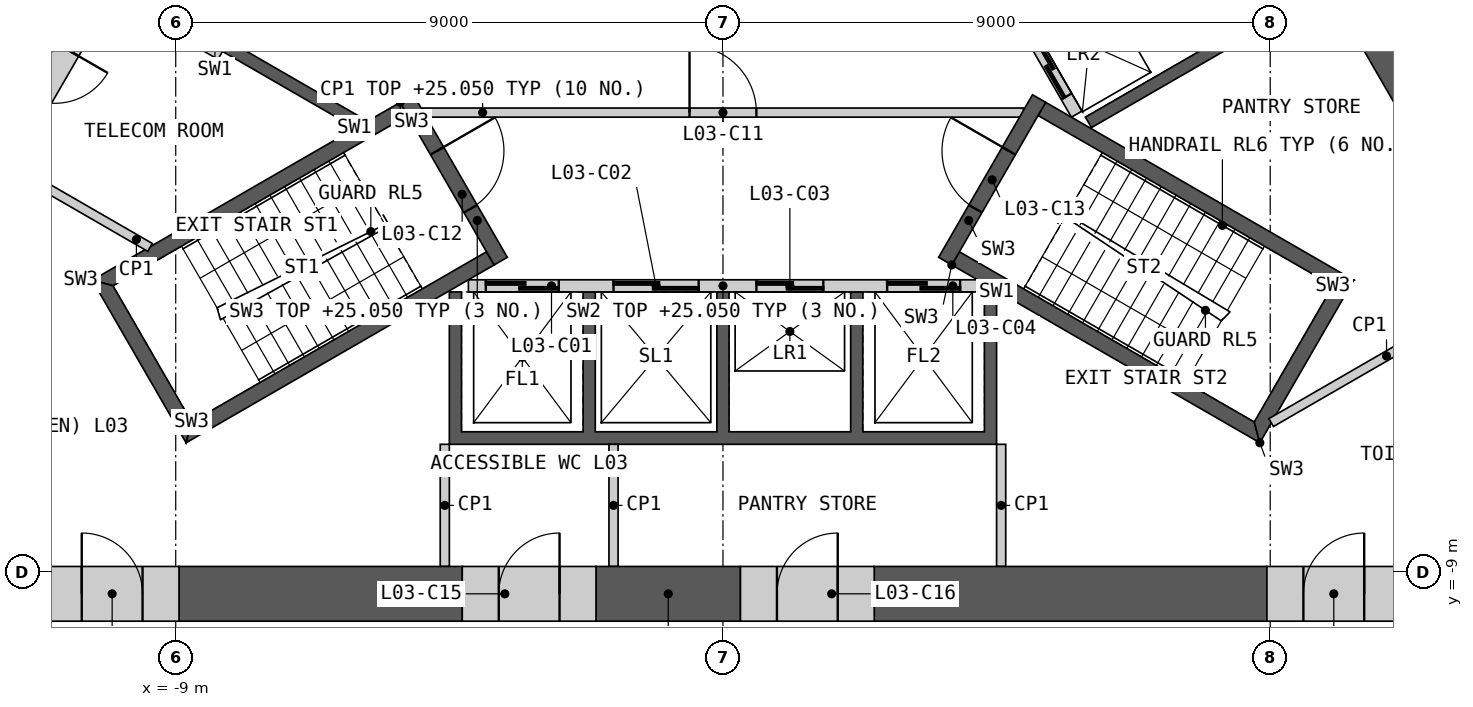
"""IFC4 building model, lengths in metres.
Left out: names, types, materials, properties, quantities, classifications, styles, units other than length and angle.
Written with IfcOpenShell. Run it as: python <this file> out.ifc"""

import sys

from ifc_helpers import new_model, si_unit, direction, frame, frame_2d, origin, place, context, subcontext, project, spatial, polyline, rectangle, outline, extrude, element, fill, save


model = new_model("IFC4")
c1 = context("Model", 3, precision=1e-05, world=origin(), true_north=direction((0.0, 1.0)))
c2 = subcontext(c1, "Body", "Model", "MODEL_VIEW")
j1 = project(units=[si_unit("LENGTHUNIT", "METRE"), si_unit("PLANEANGLEUNIT", "RADIAN")], contexts=[c1])
p1 = place(None, origin())
s1 = spatial("IfcSite", under=j1, at=p1, CompositionType="ELEMENT")
p2 = place(p1, origin())
s2 = spatial("IfcBuilding", under=s1, at=p2, CompositionType="ELEMENT")
p3 = place(p2, frame((0.0, 0.0, 21.0)))
s3 = spatial("IfcBuildingStorey", under=s2, at=p3, CompositionType="ELEMENT", Elevation=21.0)
p4 = place(p3, origin())
e1 = element("IfcWall", 1, at=p4, inside=s3, PredefinedType="SHEAR", context=c2, shape_type="SweptSolid", body=[
    extrude(outline(polyline([(4.5, -4.4), (4.5, -6.906), (-4.5, -6.906), (-4.5, -4.4), (-4.3, -4.4), (-4.3, -6.7), (-2.3, -6.7), (-2.3, -4.4), (-2.1, -4.4), (-2.1, -6.7), (-0.1, -6.7), (-0.1, -4.4), (0.1, -4.4), (0.1, -6.7), (2.1, -6.7), (2.1, -4.4), (2.3, -4.4), (2.3, -6.7), (4.3, -6.7), (4.3, -4.4), (4.5, -4.4)])), origin(), (0.0, 0.0, 1.0), 4.05),
])
p5 = place(p3, frame((-4.187, -4.3, 0.0), z_axis=(0.0, 0.0, 1.0), x_axis=(1.0, 0.0, 0.0)))
e2 = element("IfcWall", 2, at=p5, inside=s3, PredefinedType="SOLIDWALL", context=c2, shape_type="SweptSolid", body=[
    extrude(rectangle(XDim=8.373, YDim=0.2, at=frame_2d((4.187, 0.0))), origin(), (0.0, 0.0, 1.0), 4.05),
])
p6 = place(p5, frame((0.287, 0.0, 0.0)))
e3 = element("IfcOpeningElement", 3, at=p6, cuts=e2, PredefinedType="OPENING", context=c2, shape_type="SweptSolid", body=[
    extrude(rectangle(XDim=1.2, YDim=2.1, at=frame_2d((0.6, 1.05))), frame((0.0, 0.11, 0.0), z_axis=(0.0, -1.0, 0.0), x_axis=(1.0, 0.0, 0.0)), (0.0, 0.0, 1.0), 0.22),
])
p7 = place(p5, frame((2.387, 0.0, 0.0)))
e4 = element("IfcOpeningElement", 4, at=p7, cuts=e2, PredefinedType="OPENING", context=c2, shape_type="SweptSolid", body=[
    extrude(rectangle(XDim=1.4, YDim=2.1, at=frame_2d((0.7, 1.05))), frame((0.0, 0.11, 0.0), z_axis=(0.0, -1.0, 0.0), x_axis=(1.0, 0.0, 0.0)), (0.0, 0.0, 1.0), 0.22),
])
p8 = place(p5, frame((4.737, 0.0, 0.0)))
e5 = element("IfcOpeningElement", 5, at=p8, cuts=e2, PredefinedType="OPENING", context=c2, shape_type="SweptSolid", body=[
    extrude(rectangle(XDim=1.1, YDim=2.1, at=frame_2d((0.55, 1.05))), frame((0.0, 0.11, 0.0), z_axis=(0.0, -1.0, 0.0), x_axis=(1.0, 0.0, 0.0)), (0.0, 0.0, 1.0), 0.22),
])
p9 = place(p5, frame((6.887, 0.0, 0.0)))
e6 = element("IfcOpeningElement", 6, at=p9, cuts=e2, PredefinedType="OPENING", context=c2, shape_type="SweptSolid", body=[
    extrude(rectangle(XDim=1.2, YDim=2.1, at=frame_2d((0.6, 1.05))), frame((0.0, 0.11, 0.0), z_axis=(0.0, -1.0, 0.0), x_axis=(1.0, 0.0, 0.0)), (0.0, 0.0, 1.0), 0.22),
])
p10 = place(p3, origin())
e7 = element("IfcWall", 7, at=p10, inside=s3, PredefinedType="SHEAR", context=c2, shape_type="SweptSolid", body=[
    extrude(outline(polyline([(2.66, 4.192), (4.831, 5.445), (8.231, -0.444), (6.061, -1.697), (5.96, -1.524), (7.952, -0.374), (6.952, 1.358), (4.96, 0.208), (4.861, 0.381), (6.852, 1.531), (5.852, 3.263), (3.861, 2.113), (3.76, 2.287), (5.752, 3.437), (4.752, 5.169), (2.76, 4.019), (2.66, 4.192)])), origin(), (0.0, 0.0, 1.0), 4.05),
])
p11 = place(p3, frame((5.817, -1.476, 0.0), z_axis=(0.0, 0.0, 1.0), x_axis=(-0.500002616675, 0.866023893041, 0.0)))
e8 = element("IfcWall", 8, at=p11, inside=s3, PredefinedType="SOLIDWALL", context=c2, shape_type="SweptSolid", body=[
    extrude(rectangle(XDim=8.373, YDim=0.2, at=frame_2d((4.187, 0.0))), origin(), (0.0, 0.0, 1.0), 4.05),
])
p12 = place(p11, frame((0.337, 0.0, 0.0)))
e9 = element("IfcOpeningElement", 9, at=p12, cuts=e8, PredefinedType="OPENING", context=c2, shape_type="SweptSolid", body=[
    extrude(rectangle(XDim=1.1, YDim=2.1, at=frame_2d((0.55, 1.05))), frame((0.0, 0.11, 0.0), z_axis=(0.0, -1.0, 0.0), x_axis=(1.0, 0.0, 0.0)), (0.0, 0.0, 1.0), 0.22),
])
p13 = place(p11, frame((2.537, 0.0, 0.0)))
e10 = element("IfcOpeningElement", 10, at=p13, cuts=e8, PredefinedType="OPENING", context=c2, shape_type="SweptSolid", body=[
    extrude(rectangle(XDim=1.1, YDim=2.1, at=frame_2d((0.55, 1.05))), frame((0.0, 0.11, 0.0), z_axis=(0.0, -1.0, 0.0), x_axis=(1.0, 0.0, 0.0)), (0.0, 0.0, 1.0), 0.22),
])
p14 = place(p11, frame((4.737, 0.0, 0.0)))
e11 = element("IfcOpeningElement", 11, at=p14, cuts=e8, PredefinedType="OPENING", context=c2, shape_type="SweptSolid", body=[
    extrude(rectangle(XDim=1.1, YDim=2.1, at=frame_2d((0.55, 1.05))), frame((0.0, 0.11, 0.0), z_axis=(0.0, -1.0, 0.0), x_axis=(1.0, 0.0, 0.0)), (0.0, 0.0, 1.0), 0.22),
])
p15 = place(p11, frame((7.037, 0.0, 0.0)))
e12 = element("IfcOpeningElement", 12, at=p15, cuts=e8, PredefinedType="OPENING", context=c2, shape_type="SweptSolid", body=[
    extrude(rectangle(XDim=0.9, YDim=2.1, at=frame_2d((0.45, 1.05))), frame((0.0, 0.11, 0.0), z_axis=(0.0, -1.0, 0.0), x_axis=(1.0, 0.0, 0.0)), (0.0, 0.0, 1.0), 0.22),
])
p16 = place(p3, origin())
e13 = element("IfcWall", 13, at=p16, inside=s3, PredefinedType="SHEAR", context=c2, shape_type="SweptSolid", body=[
    extrude(outline(polyline([(-6.061, -1.697), (-8.231, -0.444), (-8.131, -0.271), (-5.96, -1.524), (-6.061, -1.697)])), origin(), (0.0, 0.0, 1.0), 4.05),
])
p17 = place(p3, frame((-4.941, -1.45, 0.0), z_axis=(0.0, 0.0, 1.0), x_axis=(1.0, 0.0, 0.0)))
e14 = element("IfcWall", 14, at=p17, inside=s3, PredefinedType="PARTITIONING", context=c2, shape_type="SweptSolid", body=[
    extrude(rectangle(XDim=9.882, YDim=0.15, at=frame_2d((4.941, 0.0))), origin(), (0.0, 0.0, 1.0), 4.05),
])
p18 = place(p17, frame((4.391, 0.0, 0.0)))
e15 = element("IfcOpeningElement", 15, at=p18, cuts=e14, PredefinedType="OPENING", context=c2, shape_type="SweptSolid", body=[
    extrude(rectangle(XDim=1.1, YDim=2.1, at=frame_2d((0.55, 1.05))), frame((0.0, 0.085, 0.0), z_axis=(0.0, -1.0, 0.0), x_axis=(1.0, 0.0, 0.0)), (0.0, 0.0, 1.0), 0.17),
])
p19 = place(p3, origin())
e16 = element("IfcWall", 16, at=p19, inside=s3, PredefinedType="SHEAR", context=c2, shape_type="SweptSolid", body=[
    extrude(outline(polyline([(-5.307, -1.281), (-10.374, -4.206), (-10.032, -4.298), (-5.182, -1.498), (-5.307, -1.281)])), origin(), (0.0, 0.0, 1.0), 4.05),
])
p20 = place(p3, origin())
e17 = element("IfcWall", 17, at=p20, inside=s3, PredefinedType="SHEAR", context=c2, shape_type="SweptSolid", body=[
    extrude(outline(polyline([(-10.374, -4.206), (-8.83, -6.881), (-8.738, -6.539), (-10.032, -4.298), (-10.374, -4.206)])), origin(), (0.0, 0.0, 1.0), 4.05),
])
p21 = place(p3, origin())
e18 = element("IfcWall", 18, at=p21, inside=s3, PredefinedType="SHEAR", context=c2, shape_type="SweptSolid", body=[
    extrude(outline(polyline([(-8.738, -6.539), (-8.83, -6.881), (-3.763, -3.956), (-3.888, -3.739), (-8.738, -6.539)])), origin(), (0.0, 0.0, 1.0), 4.05),
])
p22 = place(p3, frame((-5.199, -1.219, 0.0), z_axis=(0.0, 0.0, 1.0), x_axis=(0.499982516597, -0.866035497597, 0.0)))
e19 = element("IfcWall", 19, at=p22, inside=s3, PredefinedType="SHEAR", context=c2, shape_type="SweptSolid", body=[
    extrude(rectangle(XDim=3.088, YDim=0.25, at=frame_2d((1.544, 0.0))), origin(), (0.0, 0.0, 1.0), 4.05),
])
p23 = place(p22, frame((0.994, 0.0, 0.0)))
e20 = element("IfcOpeningElement", 20, at=p23, cuts=e19, PredefinedType="OPENING", context=c2, shape_type="SweptSolid", body=[
    extrude(rectangle(XDim=1.1, YDim=2.1, at=frame_2d((0.55, 1.05))), frame((0.0, 0.135, 0.0), z_axis=(0.0, -1.0, 0.0), x_axis=(1.0, 0.0, 0.0)), (0.0, 0.0, 1.0), 0.27),
])
p24 = place(p3, origin())
e21 = element("IfcWall", 21, at=p24, inside=s3, PredefinedType="SHEAR", context=c2, shape_type="SweptSolid", body=[
    extrude(outline(polyline([(3.763, -3.956), (8.83, -6.881), (8.738, -6.539), (3.888, -3.739), (3.763, -3.956)])), origin(), (0.0, 0.0, 1.0), 4.05),
])
p25 = place(p3, origin())
e22 = element("IfcWall", 22, at=p25, inside=s3, PredefinedType="SHEAR", context=c2, shape_type="SweptSolid", body=[
    extrude(outline(polyline([(8.83, -6.881), (10.374, -4.206), (10.032, -4.298), (8.738, -6.539), (8.83, -6.881)])), origin(), (0.0, 0.0, 1.0), 4.05),
])
p26 = place(p3, origin())
e23 = element("IfcWall", 23, at=p26, inside=s3, PredefinedType="SHEAR", context=c2, shape_type="SweptSolid", body=[
    extrude(outline(polyline([(10.032, -4.298), (10.374, -4.206), (5.307, -1.281), (5.182, -1.498), (10.032, -4.298)])), origin(), (0.0, 0.0, 1.0), 4.05),
])
p27 = place(p3, frame((3.655, -3.893, 0.0), z_axis=(0.0, 0.0, 1.0), x_axis=(0.499982516597, 0.866035497597, 0.0)))
e24 = element("IfcWall", 24, at=p27, inside=s3, PredefinedType="SHEAR", context=c2, shape_type="SweptSolid", body=[
    extrude(rectangle(XDim=3.088, YDim=0.25, at=frame_2d((1.544, 0.0))), origin(), (0.0, 0.0, 1.0), 4.05),
])
p28 = place(p27, frame((0.994, 0.0, 0.0)))
e25 = element("IfcOpeningElement", 25, at=p28, cuts=e24, PredefinedType="OPENING", context=c2, shape_type="SweptSolid", body=[
    extrude(rectangle(XDim=1.1, YDim=2.1, at=frame_2d((0.55, 1.05))), frame((0.0, 0.135, 0.0), z_axis=(0.0, -1.0, 0.0), x_axis=(1.0, 0.0, 0.0)), (0.0, 0.0, 1.0), 0.27),
])
p29 = place(p3, frame((-8.268, -0.509, 0.0), z_axis=(0.0, 0.0, 1.0), x_axis=(-0.866035824272, 0.499981950752, 0.0)))
e26 = element("IfcWall", 26, at=p29, inside=s3, PredefinedType="PARTITIONING", context=c2, shape_type="SweptSolid", body=[
    extrude(rectangle(XDim=2.009, YDim=0.15, at=frame_2d((1.004, 0.0))), origin(), (0.0, 0.0, 1.0), 4.05),
])
for number, where, z_axis, x_axis in (
    (27, (4.575, -6.906, 0.0), (0.0, 0.0, 1.0), (0.0, -1.0, 0.0)),
    (28, (-4.575, -6.906, 0.0), (0.0, 0.0, 1.0), (0.0, -1.0, 0.0)),
):
    element("IfcWall", number, at=place(p3, frame(where, z_axis=z_axis, x_axis=x_axis)), inside=s3, PredefinedType="PARTITIONING", context=c2, shape_type="SweptSolid", body=[
        extrude(rectangle(XDim=2.009, YDim=0.15, at=frame_2d((1.004, 0.0))), origin(), (0.0, 0.0, 1.0), 4.05),
    ])
p30 = place(p3, frame((12.81, -4.358, 0.0), z_axis=(0.0, 0.0, 1.0), x_axis=(-0.866043624834, -0.499968438888, 0.0)))
e29 = element("IfcWall", 29, at=p30, inside=s3, PredefinedType="PARTITIONING", context=c2, shape_type="SweptSolid", body=[
    extrude(rectangle(XDim=4.382, YDim=0.15, at=frame_2d((2.191, 0.0))), origin(), (0.0, 0.0, 1.0), 4.05),
])
p31 = place(p3, frame((-11.664, -2.373, 0.0), z_axis=(0.0, 0.0, 1.0), x_axis=(0.866075643493, -0.499912972175, 0.0)))
e30 = element("IfcWall", 30, at=p31, inside=s3, PredefinedType="PARTITIONING", context=c2, shape_type="SweptSolid", body=[
    extrude(rectangle(XDim=2.588, YDim=0.15, at=frame_2d((1.294, 0.0))), origin(), (0.0, 0.0, 1.0), 4.05),
])
p32 = place(p3, frame((-1.8, -8.915, 0.0), z_axis=(0.0, 0.0, 1.0), x_axis=(0.0, 1.0, 0.0)))
e31 = element("IfcWall", 31, at=p32, inside=s3, PredefinedType="PARTITIONING", context=c2, shape_type="SweptSolid", body=[
    extrude(rectangle(XDim=2.009, YDim=0.15, at=frame_2d((1.004, 0.0))), origin(), (0.0, 0.0, 1.0), 4.05),
])
p33 = place(p3, frame((2.488, -9.365, 0.0), z_axis=(0.0, 0.0, 1.0), x_axis=(1.0, 0.0, 0.0)))
e32 = element("IfcWall", 32, at=p33, inside=s3, PredefinedType="SHEAR", context=c2, shape_type="SweptSolid", body=[
    extrude(rectangle(XDim=6.458, YDim=0.9, at=frame_2d((3.229, 0.0))), origin(), (0.0, 0.0, 1.0), 4.05),
])
p34 = place(p3, frame((-8.946, -9.365, 0.0), z_axis=(0.0, 0.0, 1.0), x_axis=(1.0, 0.0, 0.0)))
e33 = element("IfcWall", 33, at=p34, inside=s3, PredefinedType="SHEAR", context=c2, shape_type="SweptSolid", body=[
    extrude(rectangle(XDim=4.658, YDim=0.9, at=frame_2d((2.329, 0.0))), origin(), (0.0, 0.0, 1.0), 4.05),
])
p35 = place(p3, frame((-2.087, -9.365, 0.0), z_axis=(0.0, 0.0, 1.0), x_axis=(1.0, 0.0, 0.0)))
e34 = element("IfcWall", 34, at=p35, inside=s3, PredefinedType="SHEAR", context=c2, shape_type="SweptSolid", body=[
    extrude(rectangle(XDim=2.375, YDim=0.9, at=frame_2d((1.188, 0.0))), origin(), (0.0, 0.0, 1.0), 4.05),
])
p36 = place(p3, frame((15.831, -8.69, 0.0), z_axis=(0.0, 0.0, 1.0), x_axis=(-0.500001798008, 0.866024365702, 0.0)))
e35 = element("IfcWall", 35, at=p36, inside=s3, PredefinedType="SHEAR", context=c2, shape_type="SweptSolid", body=[
    extrude(rectangle(XDim=10.339, YDim=0.9, at=frame_2d((5.17, 0.0))), origin(), (0.0, 0.0, 1.0), 4.05),
])
p37 = place(p3, frame((-4.288, -9.365, 0.0), z_axis=(0.0, 0.0, 1.0), x_axis=(1.0, 0.0, 0.0)))
e36 = element("IfcWall", 36, at=p37, inside=s3, PredefinedType="SHEAR", context=c2, shape_type="SweptSolid", body=[
    extrude(rectangle(XDim=2.2, YDim=0.9, at=frame_2d((1.1, 0.0))), origin(), (0.0, 0.0, 1.0), 4.05),
])
p38 = place(p37, frame((0.6, 0.0, 0.0)))
e37 = element("IfcOpeningElement", 37, at=p38, cuts=e36, PredefinedType="OPENING", context=c2, shape_type="SweptSolid", body=[
    extrude(rectangle(XDim=1.0, YDim=2.1, at=frame_2d((0.5, 1.05))), frame((0.0, 0.46, 0.0), z_axis=(0.0, -1.0, 0.0), x_axis=(1.0, 0.0, 0.0)), (0.0, 0.0, 1.0), 0.92),
])
p39 = place(p3, frame((0.288, -9.365, 0.0), z_axis=(0.0, 0.0, 1.0), x_axis=(1.0, 0.0, 0.0)))
e38 = element("IfcWall", 38, at=p39, inside=s3, PredefinedType="SHEAR", context=c2, shape_type="SweptSolid", body=[
    extrude(rectangle(XDim=2.2, YDim=0.9, at=frame_2d((1.1, 0.0))), origin(), (0.0, 0.0, 1.0), 4.05),
])
p40 = place(p39, frame((0.6, 0.0, 0.0)))
e39 = element("IfcOpeningElement", 39, at=p40, cuts=e38, PredefinedType="OPENING", context=c2, shape_type="SweptSolid", body=[
    extrude(rectangle(XDim=1.0, YDim=2.1, at=frame_2d((0.5, 1.05))), frame((0.0, 0.46, 0.0), z_axis=(0.0, -1.0, 0.0), x_axis=(1.0, 0.0, 0.0)), (0.0, 0.0, 1.0), 0.92),
])
p41 = place(p3, frame((8.946, -9.365, 0.0), z_axis=(0.0, 0.0, 1.0), x_axis=(1.0, 0.0, 0.0)))
e40 = element("IfcWall", 40, at=p41, inside=s3, PredefinedType="SHEAR", context=c2, shape_type="SweptSolid", body=[
    extrude(rectangle(XDim=2.2, YDim=0.9, at=frame_2d((1.1, 0.0))), origin(), (0.0, 0.0, 1.0), 4.05),
])
p42 = place(p41, frame((0.6, 0.0, 0.0)))
e41 = element("IfcOpeningElement", 41, at=p42, cuts=e40, PredefinedType="OPENING", context=c2, shape_type="SweptSolid", body=[
    extrude(rectangle(XDim=1.0, YDim=2.1, at=frame_2d((0.5, 1.05))), frame((0.0, 0.46, 0.0), z_axis=(0.0, -1.0, 0.0), x_axis=(1.0, 0.0, 0.0)), (0.0, 0.0, 1.0), 0.92),
])
p43 = place(p3, frame((-11.146, -9.365, 0.0), z_axis=(0.0, 0.0, 1.0), x_axis=(1.0, 0.0, 0.0)))
e42 = element("IfcWall", 42, at=p43, inside=s3, PredefinedType="SHEAR", context=c2, shape_type="SweptSolid", body=[
    extrude(rectangle(XDim=2.2, YDim=0.9, at=frame_2d((1.1, 0.0))), origin(), (0.0, 0.0, 1.0), 4.05),
])
p44 = place(p43, frame((0.6, 0.0, 0.0)))
e43 = element("IfcOpeningElement", 43, at=p44, cuts=e42, PredefinedType="OPENING", context=c2, shape_type="SweptSolid", body=[
    extrude(rectangle(XDim=1.0, YDim=2.1, at=frame_2d((0.5, 1.05))), frame((0.0, 0.46, 0.0), z_axis=(0.0, -1.0, 0.0), x_axis=(1.0, 0.0, 0.0)), (0.0, 0.0, 1.0), 0.92),
])
p45 = place(p3, frame((-10.31, 0.872, 0.0), z_axis=(0.0, 0.0, 1.0), x_axis=(-0.499982003349, -0.866035793907, 0.0)))
e44 = element("IfcWall", 44, at=p45, inside=s3, PredefinedType="SHEAR", context=c2, shape_type="SweptSolid", body=[
    extrude(rectangle(XDim=2.931, YDim=0.9, at=frame_2d((1.466, 0.0))), origin(), (0.0, 0.0, 1.0), 4.05),
])
p46 = place(p45, frame((1.35, 0.0, 0.0)))
e45 = element("IfcOpeningElement", 45, at=p46, cuts=e44, PredefinedType="OPENING", context=c2, shape_type="SweptSolid", body=[
    extrude(rectangle(XDim=1.0, YDim=2.1, at=frame_2d((0.5, 1.05))), frame((0.0, 0.46, 0.0), z_axis=(0.0, -1.0, 0.0), x_axis=(1.0, 0.0, 0.0)), (0.0, 0.0, 1.0), 0.92),
])
p47 = place(p3, frame((-15.698, -2.759, 0.0), z_axis=(0.0, 0.0, 1.0), x_axis=(0.500004292778, 0.866022925334, 0.0)))
e46 = element("IfcWall", 46, at=p47, inside=s3, PredefinedType="PARTITIONING", context=c2, shape_type="SweptSolid", body=[
    extrude(rectangle(XDim=9.898, YDim=0.2, at=frame_2d((4.949, 0.0))), origin(), (0.0, 0.0, 1.0), 4.05),
])
p48 = place(p47, frame((4.1, 0.0, 0.0)))
e47 = element("IfcOpeningElement", 47, at=p48, cuts=e46, PredefinedType="OPENING", context=c2, shape_type="SweptSolid", body=[
    extrude(rectangle(XDim=1.8, YDim=2.1, at=frame_2d((0.9, 1.05))), frame((0.0, 0.11, 0.0), z_axis=(0.0, -1.0, 0.0), x_axis=(1.0, 0.0, 0.0)), (0.0, 0.0, 1.0), 0.22),
])
p49 = place(p3, frame((10.749, 5.813, 0.0), z_axis=(0.0, 0.0, 1.0), x_axis=(0.500017363087, -0.866015378969, 0.0)))
e48 = element("IfcWall", 48, at=p49, inside=s3, PredefinedType="PARTITIONING", context=c2, shape_type="SweptSolid", body=[
    extrude(rectangle(XDim=9.77, YDim=0.2, at=frame_2d((4.885, 0.0))), origin(), (0.0, 0.0, 1.0), 4.05),
])
p50 = place(p49, frame((3.884, 0.0, 0.0)))
e49 = element("IfcOpeningElement", 49, at=p50, cuts=e48, PredefinedType="OPENING", context=c2, shape_type="SweptSolid", body=[
    extrude(rectangle(XDim=1.8, YDim=2.1, at=frame_2d((0.9, 1.05))), frame((0.0, 0.11, 0.0), z_axis=(0.0, -1.0, 0.0), x_axis=(1.0, 0.0, 0.0)), (0.0, 0.0, 1.0), 0.22),
])
p51 = place(p6, origin())
e50 = element("IfcDoor", 50, at=p51, inside=s3, OperationType="SLIDING_TO_LEFT", PredefinedType="DOOR", context=c2, shape_type="SweptSolid", body=[
    extrude(rectangle(XDim=1.2, YDim=2.1, at=frame_2d((0.6, 1.05))), frame((0.0, 0.025, 0.0), z_axis=(0.0, -1.0, 0.0), x_axis=(1.0, 0.0, 0.0)), (0.0, 0.0, 1.0), 0.05),
])
fill(e3, e50)
p52 = place(p7, origin())
e51 = element("IfcDoor", 51, at=p52, inside=s3, OperationType="SLIDING_TO_LEFT", PredefinedType="DOOR", context=c2, shape_type="SweptSolid", body=[
    extrude(rectangle(XDim=1.4, YDim=2.1, at=frame_2d((0.7, 1.05))), frame((0.0, 0.025, 0.0), z_axis=(0.0, -1.0, 0.0), x_axis=(1.0, 0.0, 0.0)), (0.0, 0.0, 1.0), 0.05),
])
fill(e4, e51)
p53 = place(p8, origin())
e52 = element("IfcDoor", 52, at=p53, inside=s3, OperationType="SLIDING_TO_LEFT", PredefinedType="DOOR", context=c2, shape_type="SweptSolid", body=[
    extrude(rectangle(XDim=1.1, YDim=2.1, at=frame_2d((0.55, 1.05))), frame((0.0, 0.025, 0.0), z_axis=(0.0, -1.0, 0.0), x_axis=(1.0, 0.0, 0.0)), (0.0, 0.0, 1.0), 0.05),
])
fill(e5, e52)
p54 = place(p9, origin())
e53 = element("IfcDoor", 53, at=p54, inside=s3, OperationType="SLIDING_TO_LEFT", PredefinedType="DOOR", context=c2, shape_type="SweptSolid", body=[
    extrude(rectangle(XDim=1.2, YDim=2.1, at=frame_2d((0.6, 1.05))), frame((0.0, 0.025, 0.0), z_axis=(0.0, -1.0, 0.0), x_axis=(1.0, 0.0, 0.0)), (0.0, 0.0, 1.0), 0.05),
])
fill(e6, e53)
p55 = place(p12, origin())
e54 = element("IfcDoor", 54, at=p55, inside=s3, OperationType="SLIDING_TO_LEFT", PredefinedType="DOOR", context=c2, shape_type="SweptSolid", body=[
    extrude(rectangle(XDim=1.1, YDim=2.1, at=frame_2d((0.55, 1.05))), frame((0.0, 0.025, 0.0), z_axis=(0.0, -1.0, 0.0), x_axis=(1.0, 0.0, 0.0)), (0.0, 0.0, 1.0), 0.05),
])
fill(e9, e54)
p56 = place(p18, origin())
e55 = element("IfcDoor", 55, at=p56, inside=s3, OperationType="SINGLE_SWING_LEFT", PredefinedType="DOOR", context=c2, shape_type="SweptSolid", body=[
    extrude(rectangle(XDim=1.1, YDim=2.1, at=frame_2d((0.55, 1.05))), frame((0.0, 0.025, 0.0), z_axis=(0.0, -1.0, 0.0), x_axis=(1.0, 0.0, 0.0)), (0.0, 0.0, 1.0), 0.05),
])
fill(e15, e55)
p57 = place(p23, origin())
e56 = element("IfcDoor", 56, at=p57, inside=s3, OperationType="SINGLE_SWING_LEFT", PredefinedType="DOOR", context=c2, shape_type="SweptSolid", body=[
    extrude(rectangle(XDim=1.1, YDim=2.1, at=frame_2d((0.55, 1.05))), frame((0.0, 0.025, 0.0), z_axis=(0.0, -1.0, 0.0), x_axis=(1.0, 0.0, 0.0)), (0.0, 0.0, 1.0), 0.05),
])
fill(e20, e56)
p58 = place(p28, origin())
e57 = element("IfcDoor", 57, at=p58, inside=s3, OperationType="SINGLE_SWING_RIGHT", PredefinedType="DOOR", context=c2, shape_type="SweptSolid", body=[
    extrude(rectangle(XDim=1.1, YDim=2.1, at=frame_2d((0.55, 1.05))), frame((0.0, 0.025, 0.0), z_axis=(0.0, -1.0, 0.0), x_axis=(1.0, 0.0, 0.0)), (0.0, 0.0, 1.0), 0.05),
])
fill(e25, e57)
p59 = place(p38, origin())
e58 = element("IfcDoor", 58, at=p59, inside=s3, OperationType="SINGLE_SWING_RIGHT", PredefinedType="DOOR", context=c2, shape_type="SweptSolid", body=[
    extrude(rectangle(XDim=1.0, YDim=2.1, at=frame_2d((0.5, 1.05))), frame((0.0, 0.205, 0.0), z_axis=(0.0, -1.0, 0.0), x_axis=(1.0, 0.0, 0.0)), (0.0, 0.0, 1.0), 0.05),
])
fill(e37, e58)
p60 = place(p40, origin())
e59 = element("IfcDoor", 59, at=p60, inside=s3, OperationType="SINGLE_SWING_RIGHT", PredefinedType="DOOR", context=c2, shape_type="SweptSolid", body=[
    extrude(rectangle(XDim=1.0, YDim=2.1, at=frame_2d((0.5, 1.05))), frame((0.0, 0.205, 0.0), z_axis=(0.0, -1.0, 0.0), x_axis=(1.0, 0.0, 0.0)), (0.0, 0.0, 1.0), 0.05),
])
fill(e39, e59)
p61 = place(p42, origin())
e60 = element("IfcDoor", 60, at=p61, inside=s3, OperationType="SINGLE_SWING_RIGHT", PredefinedType="DOOR", context=c2, shape_type="SweptSolid", body=[
    extrude(rectangle(XDim=1.0, YDim=2.1, at=frame_2d((0.5, 1.05))), frame((0.0, 0.205, 0.0), z_axis=(0.0, -1.0, 0.0), x_axis=(1.0, 0.0, 0.0)), (0.0, 0.0, 1.0), 0.05),
])
fill(e41, e60)
p62 = place(p44, origin())
e61 = element("IfcDoor", 61, at=p62, inside=s3, OperationType="SINGLE_SWING_LEFT", PredefinedType="DOOR", context=c2, shape_type="SweptSolid", body=[
    extrude(rectangle(XDim=1.0, YDim=2.1, at=frame_2d((0.5, 1.05))), frame((0.0, 0.205, 0.0), z_axis=(0.0, -1.0, 0.0), x_axis=(1.0, 0.0, 0.0)), (0.0, 0.0, 1.0), 0.05),
])
fill(e43, e61)
p63 = place(p46, origin())
e62 = element("IfcDoor", 62, at=p63, inside=s3, OperationType="SINGLE_SWING_LEFT", PredefinedType="DOOR", context=c2, shape_type="SweptSolid", body=[
    extrude(rectangle(XDim=1.0, YDim=2.1, at=frame_2d((0.5, 1.05))), frame((0.0, 0.205, 0.0), z_axis=(0.0, -1.0, 0.0), x_axis=(1.0, 0.0, 0.0)), (0.0, 0.0, 1.0), 0.05),
])
fill(e45, e62)
save(model, sys.argv[1])
